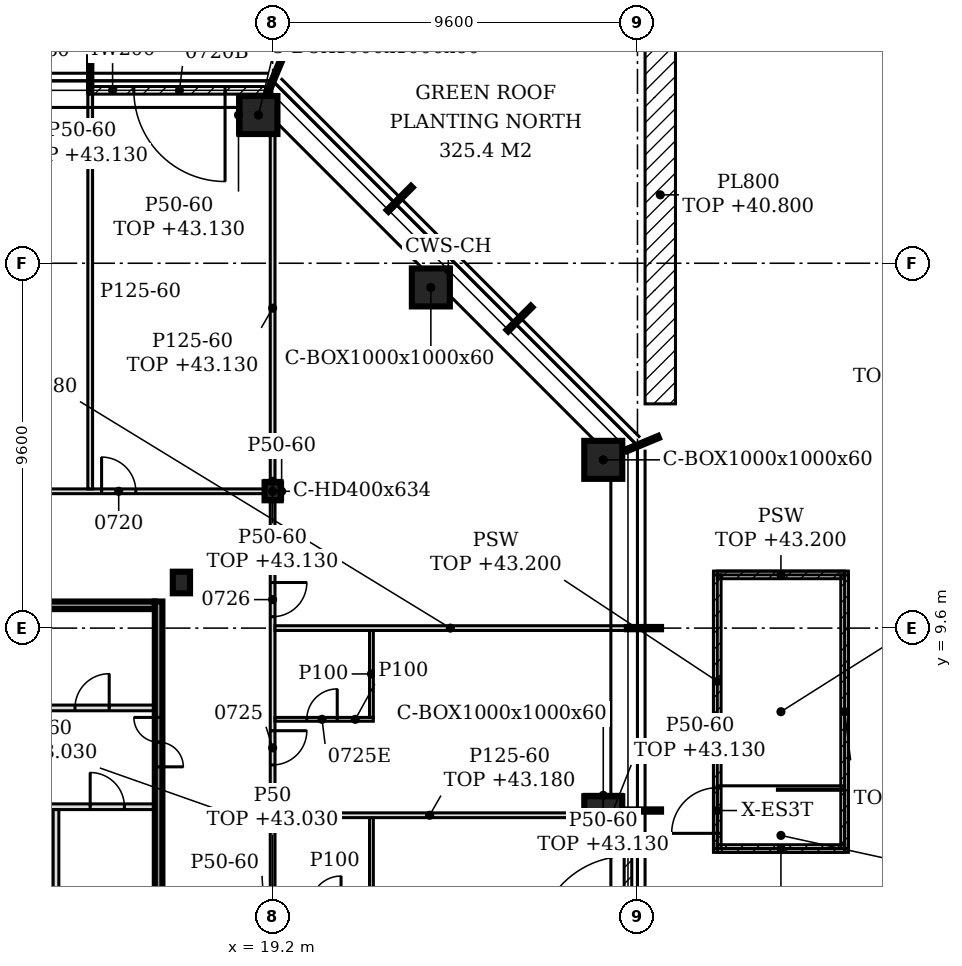
"""IFC4 building model, lengths in metres.
Left out: names, types, materials, properties, quantities, classifications, styles, units other than length and angle.
Written with IfcOpenShell. Run it as: python <this file> out.ifc"""

import sys

from ifc_helpers import new_model, si_unit, direction, frame, frame_2d, origin, origin_2d, place, context, subcontext, project, spatial, polyline, rectangle, hollow_rectangle, i_section, outline, extrude, element, fill, save


model = new_model("IFC4")
c1 = context("Model", 3, precision=1e-05, world=origin(), true_north=direction((0.0, 1.0)))
c2 = subcontext(c1, "Body", "Model", "MODEL_VIEW")
j1 = project(units=[si_unit("LENGTHUNIT", "METRE"), si_unit("PLANEANGLEUNIT", "RADIAN")], contexts=[c1])
p1 = place(None, origin())
s1 = spatial("IfcSite", under=j1, at=p1, CompositionType="ELEMENT")
p2 = place(p1, origin())
s2 = spatial("IfcBuilding", under=s1, at=p2, CompositionType="ELEMENT")
p3 = place(p2, frame((0.0, 0.0, 40.2)))
s3 = spatial("IfcBuildingStorey", under=s2, at=p3, CompositionType="ELEMENT", Elevation=40.2)
for number, where, z_axis, x_axis in (
    (1, (27.9, 4.676, -0.15), (0.0, 0.0, 1.0), (1.0, 0.0, 0.0)),
    (2, (27.9, 14.027, -0.15), (0.0, 0.0, 1.0), (1.0, 0.0, 0.0)),
    (3, (23.364, 18.564, -0.15), (0.0, 0.0, 1.0), (1.0, 0.0, 0.0)),
    (4, (18.827, 23.1, -0.15), (0.0, 0.0, 1.0), (1.0, 0.0, 0.0)),
):
    element("IfcColumn", number, at=place(p3, frame(where, z_axis=z_axis, x_axis=x_axis)), inside=s3, PredefinedType="COLUMN", context=c2, shape_type="SweptSolid", body=[
        extrude(hollow_rectangle(XDim=1.0, YDim=1.0, WallThickness=0.06, at=origin_2d()), origin(), (0.0, 0.0, 1.0), 3.6),
    ])
p4 = place(p3, frame((19.2, 13.2, -0.15), z_axis=(0.0, 0.0, 1.0), x_axis=(1.0, 0.0, 0.0)))
e5 = element("IfcColumn", 5, at=p4, inside=s3, PredefinedType="COLUMN", context=c2, shape_type="SweptSolid", body=[
    extrude(i_section(OverallWidth=0.424, OverallDepth=0.474, WebThickness=0.048, FlangeThickness=0.077, FilletRadius=0.015, at=origin_2d()), origin(), (0.0, 0.0, 1.0), 3.6),
])
p5 = place(p3, frame((16.8, 10.8, -0.15), z_axis=(0.0, 0.0, 1.0), x_axis=(1.0, 0.0, 0.0)))
e6 = element("IfcColumn", 6, at=p5, inside=s3, PredefinedType="COLUMN", context=c2, shape_type="SweptSolid", body=[
    extrude(i_section(OverallWidth=0.454, OverallDepth=0.569, WebThickness=0.078, FlangeThickness=0.125, FilletRadius=0.015, at=origin_2d()), origin(), (0.0, 0.0, 1.0), 3.6),
])
p6 = place(p3, frame((29.4, 15.5, 0.0), z_axis=(0.0, 0.0, 1.0), x_axis=(0.0, 1.0, 0.0)))
e7 = element("IfcWall", 7, at=p6, inside=s3, PredefinedType="NOTDEFINED", context=c2, shape_type="SweptSolid", body=[
    extrude(rectangle(XDim=11.0, YDim=0.8, at=frame_2d((5.5, 0.0))), origin(), (0.0, 0.0, 1.0), 0.6),
])
p7 = place(p3, frame((30.9, 3.8, 0.0), z_axis=(0.0, 0.0, 1.0), x_axis=(0.0, 1.0, 0.0)))
e8 = element("IfcWall", 8, at=p7, inside=s3, PredefinedType="SOLIDWALL", context=c2, shape_type="SweptSolid", body=[
    extrude(rectangle(XDim=7.2, YDim=0.2, at=frame_2d((3.6, 0.0))), origin(), (0.0, 0.0, 1.0), 3.0),
])
p8 = place(p7, frame((0.4, 0.0, 0.0)))
e9 = element("IfcOpeningElement", 9, at=p8, cuts=e8, PredefinedType="OPENING", context=c2, shape_type="SweptSolid", body=[
    extrude(rectangle(XDim=1.2, YDim=2.1, at=frame_2d((0.6, 1.05))), frame((0.0, 0.11, 0.0), z_axis=(0.0, -1.0, 0.0), x_axis=(1.0, 0.0, 0.0)), (0.0, 0.0, 1.0), 0.22),
])
p9 = place(p3, frame((30.9, 11.0, 0.0), z_axis=(0.0, 0.0, 1.0), x_axis=(1.0, 0.0, 0.0)))
e10 = element("IfcWall", 10, at=p9, inside=s3, PredefinedType="SOLIDWALL", context=c2, shape_type="SweptSolid", body=[
    extrude(rectangle(XDim=3.35, YDim=0.2, at=frame_2d((1.675, 0.0))), origin(), (0.0, 0.0, 1.0), 3.0),
])
p10 = place(p3, frame((34.25, 11.0, 0.0), z_axis=(0.0, 0.0, 1.0), x_axis=(0.0, -1.0, 0.0)))
e11 = element("IfcWall", 11, at=p10, inside=s3, PredefinedType="SOLIDWALL", context=c2, shape_type="SweptSolid", body=[
    extrude(rectangle(XDim=7.2, YDim=0.2, at=frame_2d((3.6, 0.0))), origin(), (0.0, 0.0, 1.0), 3.0),
])
p11 = place(p3, frame((34.25, 3.8, 0.0), z_axis=(0.0, 0.0, 1.0), x_axis=(-1.0, 0.0, 0.0)))
e12 = element("IfcWall", 12, at=p11, inside=s3, PredefinedType="SOLIDWALL", context=c2, shape_type="SweptSolid", body=[
    extrude(rectangle(XDim=3.35, YDim=0.2, at=frame_2d((1.675, 0.0))), origin(), (0.0, 0.0, 1.0), 3.0),
])
p12 = place(p3, frame((28.55, 0.03, 0.0), z_axis=(0.0, 0.0, 1.0), x_axis=(0.0, 1.0, 0.0)))
e13 = element("IfcWall", 13, at=p12, inside=s3, PredefinedType="NOTDEFINED", context=c2, shape_type="SweptSolid", body=[
    extrude(rectangle(XDim=4.74, YDim=0.2, at=frame_2d((2.37, 0.0))), origin(), (0.0, 0.0, 1.0), 3.45),
])
p13 = place(p12, frame((1.17, 0.0, 0.0)))
e14 = element("IfcOpeningElement", 14, at=p13, cuts=e13, PredefinedType="OPENING", context=c2, shape_type="SweptSolid", body=[
    extrude(rectangle(XDim=2.4, YDim=2.4, at=frame_2d((1.2, 1.2))), frame((0.0, 0.11, 0.0), z_axis=(0.0, -1.0, 0.0), x_axis=(1.0, 0.0, 0.0)), (0.0, 0.0, 1.0), 0.22),
])
p14 = place(p3, frame((19.056, 23.75, 0.0), z_axis=(0.0, 0.0, 1.0), x_axis=(-1.0, 0.0, 0.0)))
e15 = element("IfcWall", 15, at=p14, inside=s3, PredefinedType="NOTDEFINED", context=c2, shape_type="SweptSolid", body=[
    extrude(rectangle(XDim=4.626, YDim=0.2, at=frame_2d((2.313, 0.0))), origin(), (0.0, 0.0, 1.0), 3.45),
])
p15 = place(p14, frame((1.108, 0.0, 0.0)))
e16 = element("IfcOpeningElement", 16, at=p15, cuts=e15, PredefinedType="OPENING", context=c2, shape_type="SweptSolid", body=[
    extrude(rectangle(XDim=2.4, YDim=2.4, at=frame_2d((1.2, 1.2))), frame((0.0, 0.11, 0.0), z_axis=(0.0, -1.0, 0.0), x_axis=(1.0, 0.0, 0.0)), (0.0, 0.0, 1.0), 0.22),
])
p16 = place(p3, frame((9.7, 4.9, 0.0), z_axis=(0.0, 0.0, 1.0), x_axis=(1.0, 0.0, 0.0)))
e17 = element("IfcWall", 17, at=p16, inside=s3, PredefinedType="SOLIDWALL", context=c2, shape_type="SweptSolid", body=[
    extrude(rectangle(XDim=6.4, YDim=0.15, at=frame_2d((3.2, 0.0))), origin(), (0.0, 0.0, 1.0), 3.45),
])
p17 = place(p16, frame((0.45, 0.0, 0.0)))
e18 = element("IfcOpeningElement", 18, at=p17, cuts=e17, PredefinedType="OPENING", context=c2, shape_type="SweptSolid", body=[
    extrude(rectangle(XDim=1.0, YDim=2.1, at=frame_2d((0.5, 1.05))), frame((0.0, 0.085, 0.0), z_axis=(0.0, -1.0, 0.0), x_axis=(1.0, 0.0, 0.0)), (0.0, 0.0, 1.0), 0.17),
])
p18 = place(p16, frame((2.35, 0.0, 0.0)))
e19 = element("IfcOpeningElement", 19, at=p18, cuts=e17, PredefinedType="OPENING", context=c2, shape_type="SweptSolid", body=[
    extrude(rectangle(XDim=1.0, YDim=2.1, at=frame_2d((0.5, 1.05))), frame((0.0, 0.085, 0.0), z_axis=(0.0, -1.0, 0.0), x_axis=(1.0, 0.0, 0.0)), (0.0, 0.0, 1.0), 0.17),
])
p19 = place(p16, frame((4.7, 0.0, 0.0)))
e20 = element("IfcOpeningElement", 20, at=p19, cuts=e17, PredefinedType="OPENING", context=c2, shape_type="SweptSolid", body=[
    extrude(rectangle(XDim=0.9, YDim=2.1, at=frame_2d((0.45, 1.05))), frame((0.0, 0.085, 0.0), z_axis=(0.0, -1.0, 0.0), x_axis=(1.0, 0.0, 0.0)), (0.0, 0.0, 1.0), 0.17),
])
p20 = place(p3, frame((12.7, 7.5, 0.0), z_axis=(0.0, 0.0, 1.0), x_axis=(1.0, 0.0, 0.0)))
e21 = element("IfcWall", 21, at=p20, inside=s3, PredefinedType="SOLIDWALL", context=c2, shape_type="SweptSolid", body=[
    extrude(rectangle(XDim=3.4, YDim=0.15, at=frame_2d((1.7, 0.0))), origin(), (0.0, 0.0, 1.0), 3.45),
])
p21 = place(p20, frame((1.3, 0.0, 0.0)))
e22 = element("IfcOpeningElement", 22, at=p21, cuts=e21, PredefinedType="OPENING", context=c2, shape_type="SweptSolid", body=[
    extrude(rectangle(XDim=0.9, YDim=2.1, at=frame_2d((0.45, 1.05))), frame((0.0, 0.085, 0.0), z_axis=(0.0, -1.0, 0.0), x_axis=(1.0, 0.0, 0.0)), (0.0, 0.0, 1.0), 0.17),
])
p22 = place(p3, frame((12.7, 10.2, 0.0), z_axis=(0.0, 0.0, 1.0), x_axis=(1.0, 0.0, 0.0)))
e23 = element("IfcWall", 23, at=p22, inside=s3, PredefinedType="SOLIDWALL", context=c2, shape_type="SweptSolid", body=[
    extrude(rectangle(XDim=3.4, YDim=0.2, at=frame_2d((1.7, 0.0))), origin(), (0.0, 0.0, 1.0), 3.45),
])
p23 = place(p3, frame((13.5, 2.275, 0.0), z_axis=(0.0, 0.0, 1.0), x_axis=(0.0, 1.0, 0.0)))
e24 = element("IfcWall", 24, at=p23, inside=s3, PredefinedType="SOLIDWALL", context=c2, shape_type="SweptSolid", body=[
    extrude(rectangle(XDim=2.55, YDim=0.15, at=frame_2d((1.275, 0.0))), origin(), (0.0, 0.0, 1.0), 3.45),
])
p24 = place(p3, frame((16.2, -5.5, 0.0), z_axis=(0.0, 0.0, 1.0), x_axis=(0.0, 1.0, 0.0)))
e25 = element("IfcWall", 25, at=p24, inside=s3, PredefinedType="SOLIDWALL", context=c2, shape_type="SweptSolid", body=[
    extrude(rectangle(XDim=15.8, YDim=0.2, at=frame_2d((7.9, 0.0))), origin(), (0.0, 0.0, 1.0), 3.45),
])
p25 = place(p24, frame((3.05, 0.0, 0.0)))
e26 = element("IfcOpeningElement", 26, at=p25, cuts=e25, PredefinedType="OPENING", context=c2, shape_type="SweptSolid", body=[
    extrude(rectangle(XDim=1.3, YDim=2.1, at=frame_2d((0.65, 1.05))), frame((0.0, 0.11, 0.0), z_axis=(0.0, -1.0, 0.0), x_axis=(1.0, 0.0, 0.0)), (0.0, 0.0, 1.0), 0.22),
])
p26 = place(p24, frame((11.45, 0.0, 0.0)))
e27 = element("IfcOpeningElement", 27, at=p26, cuts=e25, PredefinedType="OPENING", context=c2, shape_type="SweptSolid", body=[
    extrude(rectangle(XDim=1.3, YDim=2.1, at=frame_2d((0.65, 1.05))), frame((0.0, 0.11, 0.0), z_axis=(0.0, -1.0, 0.0), x_axis=(1.0, 0.0, 0.0)), (0.0, 0.0, 1.0), 0.22),
])
p27 = place(p3, frame((21.8, 2.326, 0.0), z_axis=(0.0, 0.0, 1.0), x_axis=(0.0, 1.0, 0.0)))
e28 = element("IfcWall", 28, at=p27, inside=s3, PredefinedType="PARTITIONING", context=c2, shape_type="SweptSolid", body=[
    extrude(rectangle(XDim=2.288, YDim=0.1, at=frame_2d((1.144, 0.0))), origin(), (0.0, 0.0, 1.0), 3.45),
])
p28 = place(p3, frame((19.2, 2.637, 0.0), z_axis=(0.0, 0.0, 1.0), x_axis=(0.0, 1.0, 0.0)))
e29 = element("IfcWall", 29, at=p28, inside=s3, PredefinedType="PARTITIONING", context=c2, shape_type="SweptSolid", body=[
    extrude(rectangle(XDim=10.326, YDim=0.125, at=frame_2d((5.163, 0.0))), origin(), (0.0, 0.0, 1.0), 2.83),
])
p29 = place(p28, frame((3.363, 0.0, 0.0)))
e30 = element("IfcOpeningElement", 30, at=p29, cuts=e29, PredefinedType="OPENING", context=c2, shape_type="SweptSolid", body=[
    extrude(rectangle(XDim=0.9, YDim=2.1, at=frame_2d((0.45, 1.05))), frame((0.0, 0.073, 0.0), z_axis=(0.0, -1.0, 0.0), x_axis=(1.0, 0.0, 0.0)), (0.0, 0.0, 1.0), 0.145),
])
p30 = place(p28, frame((7.263, 0.0, 0.0)))
e31 = element("IfcOpeningElement", 31, at=p30, cuts=e29, PredefinedType="OPENING", context=c2, shape_type="SweptSolid", body=[
    extrude(rectangle(XDim=0.9, YDim=2.1, at=frame_2d((0.45, 1.05))), frame((0.0, 0.073, 0.0), z_axis=(0.0, -1.0, 0.0), x_axis=(1.0, 0.0, 0.0)), (0.0, 0.0, 1.0), 0.145),
])
p31 = place(p3, frame((19.262, 4.676, 0.0), z_axis=(0.0, 0.0, 1.0), x_axis=(1.0, 0.0, 0.0)))
e32 = element("IfcWall", 32, at=p31, inside=s3, PredefinedType="PARTITIONING", context=c2, shape_type="SweptSolid", body=[
    extrude(outline(polyline([(0.0, 0.0), (8.137, 0.0), (8.137, 2.98), (0.087, 2.98), (0.085, 2.83), (0.0, 2.83), (0.0, 0.0)])), frame((0.0, 0.062, 0.0), z_axis=(0.0, -1.0, 0.0), x_axis=(1.0, 0.0, 0.0)), (0.0, 0.0, 1.0), 0.125),
])
p32 = place(p3, frame((19.262, 7.2, 0.0), z_axis=(0.0, 0.0, 1.0), x_axis=(1.0, 0.0, 0.0)))
e33 = element("IfcWall", 33, at=p32, inside=s3, PredefinedType="PARTITIONING", context=c2, shape_type="SweptSolid", body=[
    extrude(outline(polyline([(0.0, 0.0), (2.588, 0.0), (2.587, 3.45), (0.087, 3.45), (0.085, 2.83), (0.0, 2.83), (0.0, 0.0)])), frame((0.0, 0.05, 0.0), z_axis=(0.0, -1.0, 0.0), x_axis=(1.0, 0.0, 0.0)), (0.0, 0.0, 1.0), 0.1),
])
p33 = place(p32, frame((0.837, 0.0, 0.0)))
e34 = element("IfcOpeningElement", 34, at=p33, cuts=e33, PredefinedType="OPENING", context=c2, shape_type="SweptSolid", body=[
    extrude(rectangle(XDim=0.8, YDim=2.1, at=frame_2d((0.4, 1.05))), frame((0.0, 0.06, 0.0), z_axis=(0.0, -1.0, 0.0), x_axis=(1.0, 0.0, 0.0)), (0.0, 0.0, 1.0), 0.12),
])
p34 = place(p3, frame((21.8, 7.25, 0.0), z_axis=(0.0, 0.0, 1.0), x_axis=(0.0, 1.0, 0.0)))
e35 = element("IfcWall", 35, at=p34, inside=s3, PredefinedType="PARTITIONING", context=c2, shape_type="SweptSolid", body=[
    extrude(outline(polyline([(0.0, 0.0), (2.288, 0.0), (2.288, 2.98), (2.255, 2.98), (2.253, 3.45), (0.0, 3.45), (0.0, 0.0)])), frame((0.0, 0.05, 0.0), z_axis=(0.0, -1.0, 0.0), x_axis=(1.0, 0.0, 0.0)), (0.0, 0.0, 1.0), 0.1),
])
p35 = place(p3, frame((19.262, 9.6, 0.0), z_axis=(0.0, 0.0, 1.0), x_axis=(1.0, 0.0, 0.0)))
e36 = element("IfcWall", 36, at=p35, inside=s3, PredefinedType="PARTITIONING", context=c2, shape_type="SweptSolid", body=[
    extrude(outline(polyline([(0.0, 0.0), (9.228, 0.0), (9.228, 2.98), (8.788, 2.98), (8.785, 2.93), (8.488, 2.93), (8.486, 2.98), (0.087, 2.98), (0.085, 2.83), (0.0, 2.83), (0.0, 0.0)])), frame((0.0, 0.062, 0.0), z_axis=(0.0, -1.0, 0.0), x_axis=(1.0, 0.0, 0.0)), (0.0, 0.0, 1.0), 0.125),
])
p36 = place(p3, frame((7.412, 13.2, 0.0), z_axis=(0.0, 0.0, 1.0), x_axis=(1.0, 0.0, 0.0)))
e37 = element("IfcWall", 37, at=p36, inside=s3, PredefinedType="PARTITIONING", context=c2, shape_type="SweptSolid", body=[
    extrude(rectangle(XDim=11.576, YDim=0.125, at=frame_2d((5.788, 0.0))), origin(), (0.0, 0.0, 1.0), 2.83),
])
p37 = place(p36, frame((0.788, 0.0, 0.0)))
e38 = element("IfcOpeningElement", 38, at=p37, cuts=e37, PredefinedType="OPENING", context=c2, shape_type="SweptSolid", body=[
    extrude(rectangle(XDim=0.9, YDim=2.1, at=frame_2d((0.45, 1.05))), frame((0.0, 0.073, 0.0), z_axis=(0.0, -1.0, 0.0), x_axis=(1.0, 0.0, 0.0)), (0.0, 0.0, 1.0), 0.145),
])
p38 = place(p36, frame((2.302, 0.0, 0.0)))
e39 = element("IfcOpeningElement", 39, at=p38, cuts=e37, PredefinedType="OPENING", context=c2, shape_type="SweptSolid", body=[
    extrude(rectangle(XDim=0.9, YDim=2.1, at=frame_2d((0.45, 1.05))), frame((0.0, 0.073, 0.0), z_axis=(0.0, -1.0, 0.0), x_axis=(1.0, 0.0, 0.0)), (0.0, 0.0, 1.0), 0.145),
])
p39 = place(p36, frame((7.288, 0.0, 0.0)))
e40 = element("IfcOpeningElement", 40, at=p39, cuts=e37, PredefinedType="OPENING", context=c2, shape_type="SweptSolid", body=[
    extrude(rectangle(XDim=0.9, YDim=2.1, at=frame_2d((0.45, 1.05))), frame((0.0, 0.073, 0.0), z_axis=(0.0, -1.0, 0.0), x_axis=(1.0, 0.0, 0.0)), (0.0, 0.0, 1.0), 0.145),
])
p40 = place(p3, frame((14.4, 13.262, 0.0), z_axis=(0.0, 0.0, 1.0), x_axis=(0.0, 1.0, 0.0)))
e41 = element("IfcWall", 41, at=p40, inside=s3, PredefinedType="PARTITIONING", context=c2, shape_type="SweptSolid", body=[
    extrude(outline(polyline([(0.0, 0.0), (10.387, 0.0), (10.387, 3.45), (9.988, 3.45), (9.986, 2.93), (9.688, 2.93), (9.686, 3.45), (6.042, 3.45), (6.041, 2.88), (5.833, 2.88), (5.831, 3.45), (0.087, 3.45), (0.085, 2.83), (0.0, 2.83), (0.0, 0.0)])), frame((0.0, 0.062, 0.0), z_axis=(0.0, -1.0, 0.0), x_axis=(1.0, 0.0, 0.0)), (0.0, 0.0, 1.0), 0.125),
])
p41 = place(p3, frame((19.2, 13.437, 0.0), z_axis=(0.0, 0.0, 1.0), x_axis=(0.0, 1.0, 0.0)))
e42 = element("IfcWall", 42, at=p41, inside=s3, PredefinedType="PARTITIONING", context=c2, shape_type="SweptSolid", body=[
    extrude(outline(polyline([(0.0, 0.0), (9.163, 0.0), (9.163, 2.63), (8.733, 2.63), (8.731, 2.93), (0.0, 2.93), (0.0, 0.0)])), frame((0.0, 0.062, 0.0), z_axis=(0.0, -1.0, 0.0), x_axis=(1.0, 0.0, 0.0)), (0.0, 0.0, 1.0), 0.125),
])
p42 = place(p3, frame((19.437, 12.963, 0.0), z_axis=(0.0, 0.0, 1.0), x_axis=(0.0, 1.0, 0.0)))
e43 = element("IfcWall", 43, at=p42, inside=s3, PredefinedType="PARTITIONING", context=c2, shape_type="SweptSolid", body=[
    extrude(rectangle(XDim=0.474, YDim=0.05, at=frame_2d((0.237, 0.0))), origin(), (0.0, 0.0, 1.0), 3.45),
])
for number, where, z_axis, x_axis in (
    (44, (27.4, 5.201, 0.0), (0.0, 0.0, 1.0), (1.0, 0.0, 0.0)),
    (45, (27.4, 4.151, 0.0), (0.0, 0.0, 1.0), (1.0, 0.0, 0.0)),
):
    element("IfcWall", number, at=place(p3, frame(where, z_axis=z_axis, x_axis=x_axis)), inside=s3, PredefinedType="PARTITIONING", context=c2, shape_type="SweptSolid", body=[
        extrude(rectangle(XDim=1.0, YDim=0.05, at=frame_2d((0.5, 0.0))), origin(), (0.0, 0.0, 1.0), 2.93),
    ])
p43 = place(p3, frame((18.988, 13.462, 0.0), z_axis=(0.0, 0.0, 1.0), x_axis=(1.0, 0.0, 0.0)))
e46 = element("IfcWall", 46, at=p43, inside=s3, PredefinedType="PARTITIONING", context=c2, shape_type="SweptSolid", body=[
    extrude(rectangle(XDim=0.424, YDim=0.05, at=frame_2d((0.212, 0.0))), origin(), (0.0, 0.0, 1.0), 2.93),
])
p44 = place(p3, frame((18.302, 22.6, 0.0), z_axis=(0.0, 0.0, 1.0), x_axis=(0.0, 1.0, 0.0)))
e47 = element("IfcWall", 47, at=p44, inside=s3, PredefinedType="PARTITIONING", context=c2, shape_type="SweptSolid", body=[
    extrude(rectangle(XDim=1.0, YDim=0.05, at=frame_2d((0.5, 0.0))), origin(), (0.0, 0.0, 1.0), 2.93),
])
p45 = place(p8, origin())
e48 = element("IfcDoor", 48, at=p45, inside=s3, OperationType="SINGLE_SWING_LEFT", PredefinedType="DOOR", context=c2, shape_type="SweptSolid", body=[
    extrude(rectangle(XDim=1.2, YDim=2.1, at=frame_2d((0.6, 1.05))), frame((0.0, 0.025, 0.0), z_axis=(0.0, -1.0, 0.0), x_axis=(1.0, 0.0, 0.0)), (0.0, 0.0, 1.0), 0.05),
])
fill(e9, e48)
p46 = place(p13, origin())
e49 = element("IfcDoor", 49, at=p46, inside=s3, OperationType="SINGLE_SWING_LEFT", PredefinedType="DOOR", context=c2, shape_type="SweptSolid", body=[
    extrude(rectangle(XDim=2.4, YDim=2.4, at=frame_2d((1.2, 1.2))), frame((0.0, 0.025, 0.0), z_axis=(0.0, -1.0, 0.0), x_axis=(1.0, 0.0, 0.0)), (0.0, 0.0, 1.0), 0.05),
])
fill(e14, e49)
p47 = place(p15, origin())
e50 = element("IfcDoor", 50, at=p47, inside=s3, OperationType="SINGLE_SWING_LEFT", PredefinedType="DOOR", context=c2, shape_type="SweptSolid", body=[
    extrude(rectangle(XDim=2.4, YDim=2.4, at=frame_2d((1.2, 1.2))), frame((0.0, 0.025, 0.0), z_axis=(0.0, -1.0, 0.0), x_axis=(1.0, 0.0, 0.0)), (0.0, 0.0, 1.0), 0.05),
])
fill(e16, e50)
p48 = place(p26, origin())
e51 = element("IfcDoor", 51, at=p48, inside=s3, OperationType="DOUBLE_DOOR_SINGLE_SWING", PredefinedType="DOOR", context=c2, shape_type="SweptSolid", body=[
    extrude(rectangle(XDim=1.3, YDim=2.1, at=frame_2d((0.65, 1.05))), frame((0.0, 0.025, 0.0), z_axis=(0.0, -1.0, 0.0), x_axis=(1.0, 0.0, 0.0)), (0.0, 0.0, 1.0), 0.05),
])
fill(e27, e51)
p49 = place(p19, origin())
e52 = element("IfcDoor", 52, at=p49, inside=s3, OperationType="SINGLE_SWING_LEFT", PredefinedType="DOOR", context=c2, shape_type="SweptSolid", body=[
    extrude(rectangle(XDim=0.9, YDim=2.1, at=frame_2d((0.45, 1.05))), frame((0.0, 0.025, 0.0), z_axis=(0.0, -1.0, 0.0), x_axis=(1.0, 0.0, 0.0)), (0.0, 0.0, 1.0), 0.05),
])
fill(e20, e52)
p50 = place(p21, origin())
e53 = element("IfcDoor", 53, at=p50, inside=s3, OperationType="SINGLE_SWING_RIGHT", PredefinedType="DOOR", context=c2, shape_type="SweptSolid", body=[
    extrude(rectangle(XDim=0.9, YDim=2.1, at=frame_2d((0.45, 1.05))), frame((0.0, 0.025, 0.0), z_axis=(0.0, -1.0, 0.0), x_axis=(1.0, 0.0, 0.0)), (0.0, 0.0, 1.0), 0.05),
])
fill(e22, e53)
p51 = place(p39, origin())
e54 = element("IfcDoor", 54, at=p51, inside=s3, OperationType="SINGLE_SWING_LEFT", PredefinedType="DOOR", context=c2, shape_type="SweptSolid", body=[
    extrude(rectangle(XDim=0.9, YDim=2.1, at=frame_2d((0.45, 1.05))), frame((0.0, 0.025, 0.0), z_axis=(0.0, -1.0, 0.0), x_axis=(1.0, 0.0, 0.0)), (0.0, 0.0, 1.0), 0.05),
])
fill(e40, e54)
p52 = place(p29, frame((0.9, 0.0, 0.0), z_axis=(0.0, 0.0, 1.0), x_axis=(-1.0, 0.0, 0.0)))
e55 = element("IfcDoor", 55, at=p52, inside=s3, OperationType="SINGLE_SWING_LEFT", PredefinedType="DOOR", context=c2, shape_type="SweptSolid", body=[
    extrude(rectangle(XDim=0.9, YDim=2.1, at=frame_2d((0.45, 1.05))), frame((0.0, 0.025, 0.0), z_axis=(0.0, -1.0, 0.0), x_axis=(1.0, 0.0, 0.0)), (0.0, 0.0, 1.0), 0.05),
])
fill(e30, e55)
p53 = place(p33, origin())
e56 = element("IfcDoor", 56, at=p53, inside=s3, OperationType="SINGLE_SWING_RIGHT", PredefinedType="DOOR", context=c2, shape_type="SweptSolid", body=[
    extrude(rectangle(XDim=0.8, YDim=2.1, at=frame_2d((0.4, 1.05))), frame((0.0, 0.025, 0.0), z_axis=(0.0, -1.0, 0.0), x_axis=(1.0, 0.0, 0.0)), (0.0, 0.0, 1.0), 0.05),
])
fill(e34, e56)
p54 = place(p30, frame((0.9, 0.0, 0.0), z_axis=(0.0, 0.0, 1.0), x_axis=(-1.0, 0.0, 0.0)))
e57 = element("IfcDoor", 57, at=p54, inside=s3, OperationType="SINGLE_SWING_LEFT", PredefinedType="DOOR", context=c2, shape_type="SweptSolid", body=[
    extrude(rectangle(XDim=0.9, YDim=2.1, at=frame_2d((0.45, 1.05))), frame((0.0, 0.025, 0.0), z_axis=(0.0, -1.0, 0.0), x_axis=(1.0, 0.0, 0.0)), (0.0, 0.0, 1.0), 0.05),
])
fill(e31, e57)
save(model, sys.argv[1])
